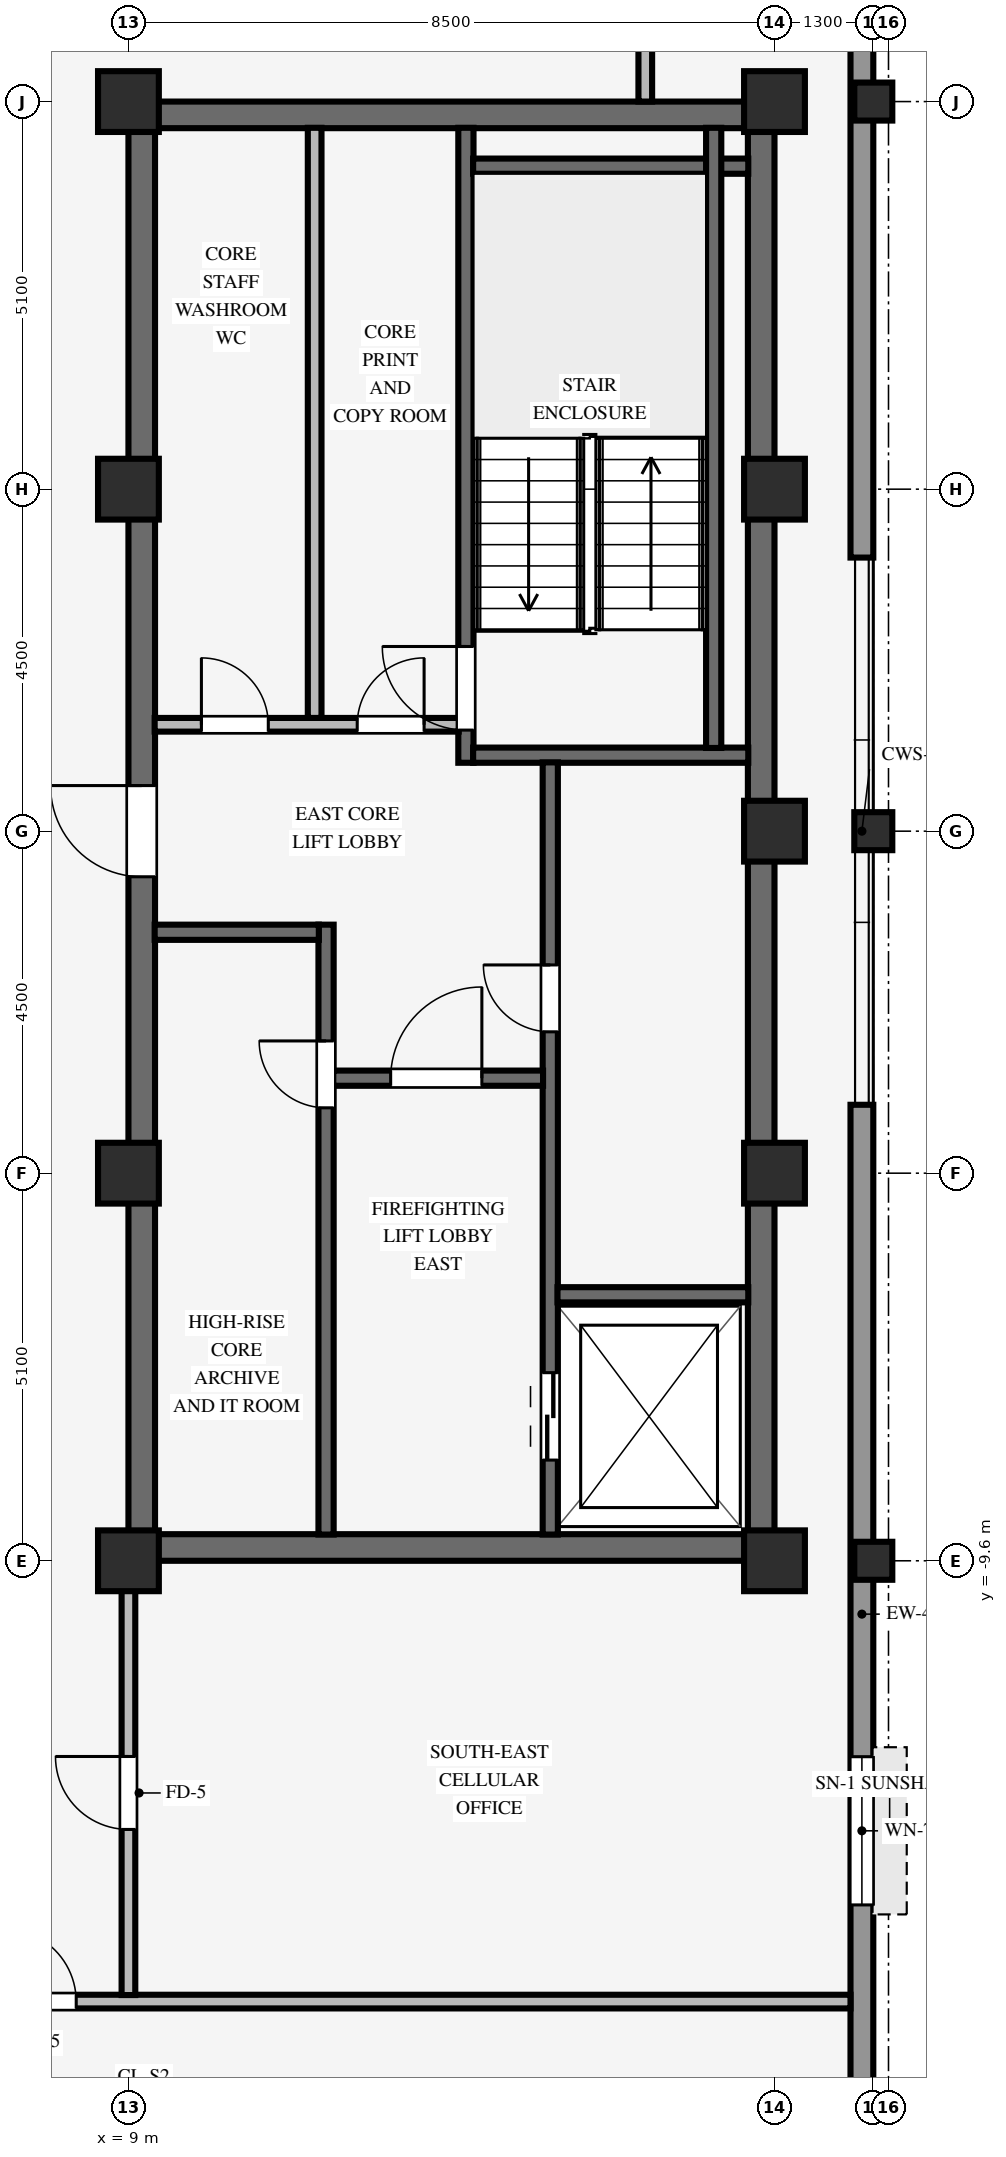
"""IFC4 building model, lengths in metres.
Left out: names, types, materials, properties, quantities, classifications, styles, units other than length and angle.
Written with IfcOpenShell. Run it as: python <this file> out.ifc"""

import sys

from ifc_helpers import new_model, si_unit, direction, frame, frame_2d, origin, origin_2d, place, context, subcontext, project, spatial, rectangle, hollow_rectangle, extrude, source, transform, mapped, element, fill, save


model = new_model("IFC4")
c1 = context("Model", 3, precision=1e-05, world=origin(), true_north=direction((0.0, 1.0)))
c2 = subcontext(c1, "Body", "Model", "MODEL_VIEW")
j1 = project(units=[si_unit("LENGTHUNIT", "METRE"), si_unit("PLANEANGLEUNIT", "RADIAN")], contexts=[c1])
p1 = place(None, origin())
s1 = spatial("IfcSite", under=j1, at=p1, CompositionType="ELEMENT")
p2 = place(p1, origin())
s2 = spatial("IfcBuilding", under=s1, at=p2, CompositionType="ELEMENT")
p3 = place(p2, frame((0.0, 0.0, 249.3)))
s3 = spatial("IfcBuildingStorey", under=s2, at=p3, CompositionType="ELEMENT", Elevation=249.3)
for number, where, z_axis, x_axis in (
    (1, (9.0, -9.425, 0.0), (0.0, 0.0, 1.0), (1.0, 0.0, 0.0)),
    (2, (9.0, 9.425, 0.0), (0.0, 0.0, 1.0), (1.0, 0.0, 0.0)),
):
    element("IfcWall", number, at=place(p3, frame(where, z_axis=z_axis, x_axis=x_axis)), inside=s3, PredefinedType="SHEAR", context=c2, shape_type="SweptSolid", body=[
        extrude(rectangle(XDim=8.5, YDim=0.35, at=frame_2d((4.25, 0.0))), origin(), (0.0, 0.0, 1.0), 3.25),
    ])
p4 = place(p3, frame((9.175, -9.255, 0.0), z_axis=(0.0, 0.0, 1.0), x_axis=(0.0, 1.0, 0.0)))
e3 = element("IfcWall", 3, at=p4, inside=s3, PredefinedType="SHEAR", context=c2, shape_type="SweptSolid", body=[
    extrude(rectangle(XDim=18.51, YDim=0.35, at=frame_2d((9.255, 0.0))), origin(), (0.0, 0.0, 1.0), 3.25),
])
p5 = place(p4, frame((8.655, 0.0, 0.0)))
e4 = element("IfcOpeningElement", 4, at=p5, cuts=e3, PredefinedType="OPENING", context=c2, shape_type="SweptSolid", body=[
    extrude(rectangle(XDim=1.2, YDim=2.15, at=frame_2d((0.6, 1.075))), frame((0.0, 0.185, 0.0), z_axis=(0.0, -1.0, 0.0), x_axis=(1.0, 0.0, 0.0)), (0.0, 0.0, 1.0), 0.37),
])
p6 = place(p3, frame((17.325, -9.255, 0.0), z_axis=(0.0, 0.0, 1.0), x_axis=(0.0, 1.0, 0.0)))
e5 = element("IfcWall", 5, at=p6, inside=s3, PredefinedType="SHEAR", context=c2, shape_type="SweptSolid", body=[
    extrude(rectangle(XDim=18.51, YDim=0.35, at=frame_2d((9.255, 0.0))), origin(), (0.0, 0.0, 1.0), 3.25),
])
for number, where, z_axis, x_axis in (
    (6, (9.0, -9.6, 0.0), (0.0, 0.0, 1.0), (1.0, 0.0, 0.0)),
    (7, (9.0, -4.5, 0.0), (0.0, 0.0, 1.0), (1.0, 0.0, 0.0)),
    (8, (9.0, 4.5, 0.0), (0.0, 0.0, 1.0), (1.0, 0.0, 0.0)),
    (9, (9.0, 9.6, 0.0), (0.0, 0.0, 1.0), (1.0, 0.0, 0.0)),
    (10, (17.5, -9.6, 0.0), (0.0, 0.0, 1.0), (1.0, 0.0, 0.0)),
    (11, (17.5, -4.5, 0.0), (0.0, 0.0, 1.0), (1.0, 0.0, 0.0)),
    (12, (17.5, 4.5, 0.0), (0.0, 0.0, 1.0), (1.0, 0.0, 0.0)),
    (13, (17.5, 9.6, 0.0), (0.0, 0.0, 1.0), (1.0, 0.0, 0.0)),
    (14, (17.5, 0.0, 0.0), (0.0, 0.0, 1.0), (1.0, 0.0, 0.0)),
):
    element("IfcColumn", number, at=place(p3, frame(where, z_axis=z_axis, x_axis=x_axis)), inside=s3, PredefinedType="COLUMN", context=c2, shape_type="SweptSolid", body=[
        extrude(rectangle(XDim=0.8, YDim=0.8, at=origin_2d()), origin(), (0.0, 0.0, 1.0), 3.25),
    ])
for number, where, z_axis, x_axis in (
    (15, (18.8, -9.6, 0.0), (0.0, 0.0, 1.0), (1.0, 0.0, 0.0)),
    (16, (18.8, 0.0, 0.0), (0.0, 0.0, 1.0), (1.0, 0.0, 0.0)),
    (17, (18.8, 9.6, 0.0), (0.0, 0.0, 1.0), (1.0, 0.0, 0.0)),
):
    element("IfcColumn", number, at=place(p3, frame(where, z_axis=z_axis, x_axis=x_axis)), inside=s3, PredefinedType="COLUMN", context=c2, shape_type="SweptSolid", body=[
        extrude(hollow_rectangle(XDim=0.5, YDim=0.5, WallThickness=0.032, InnerFilletRadius=0.032, OuterFilletRadius=0.064, at=origin_2d()), origin(), (0.0, 0.0, 1.0), 3.25),
    ])
p7 = place(p3, frame((18.65, -17.004, 0.0), z_axis=(0.0, 0.0, 1.0), x_axis=(0.0, 1.0, 0.0)))
e18 = element("IfcWall", 18, at=p7, inside=s3, PredefinedType="STANDARD", context=c2, shape_type="SweptSolid", body=[
    extrude(rectangle(XDim=13.404, YDim=0.3, at=frame_2d((6.702, 0.0))), origin(), (0.0, 0.0, 1.0), 2.585),
])
p8 = place(p7, frame((2.876, 0.0, 0.8)))
e19 = element("IfcOpeningElement", 19, at=p8, cuts=e18, PredefinedType="OPENING", context=c2, shape_type="SweptSolid", body=[
    extrude(rectangle(XDim=1.95, YDim=1.48, at=frame_2d((0.975, 0.74))), frame((0.0, 0.16, 0.0), z_axis=(0.0, -1.0, 0.0), x_axis=(1.0, 0.0, 0.0)), (0.0, 0.0, 1.0), 0.32),
])
p9 = place(p3, frame((18.65, 3.6, 0.0), z_axis=(0.0, 0.0, 1.0), x_axis=(0.0, 1.0, 0.0)))
e20 = element("IfcWall", 20, at=p9, inside=s3, PredefinedType="STANDARD", context=c2, shape_type="SweptSolid", body=[
    extrude(rectangle(XDim=13.404, YDim=0.3, at=frame_2d((6.702, 0.0))), origin(), (0.0, 0.0, 1.0), 2.585),
])
p10 = place(p9, frame((8.578, 0.0, 0.8)))
e21 = element("IfcOpeningElement", 21, at=p10, cuts=e20, PredefinedType="OPENING", context=c2, shape_type="SweptSolid", body=[
    extrude(rectangle(XDim=1.95, YDim=1.48, at=frame_2d((0.975, 0.74))), frame((0.0, 0.16, 0.0), z_axis=(0.0, -1.0, 0.0), x_axis=(1.0, 0.0, 0.0)), (0.0, 0.0, 1.0), 0.32),
])
p11 = place(p3, frame((13.44, 0.9, 0.0), z_axis=(0.0, 0.0, 1.0), x_axis=(0.0, 1.0, 0.0)))
e22 = element("IfcWall", 22, at=p11, inside=s3, PredefinedType="SHEAR", context=c2, shape_type="SweptSolid", body=[
    extrude(rectangle(XDim=8.355, YDim=0.2, at=frame_2d((4.177, 0.0))), origin(), (0.0, 0.0, 1.0), 3.25),
])
p12 = place(p11, frame((0.43, 0.0, 0.0)))
e23 = element("IfcOpeningElement", 23, at=p12, cuts=e22, PredefinedType="OPENING", context=c2, shape_type="SweptSolid", body=[
    extrude(rectangle(XDim=1.1, YDim=2.15, at=frame_2d((0.55, 1.075))), frame((0.0, 0.11, 0.0), z_axis=(0.0, -1.0, 0.0), x_axis=(1.0, 0.0, 0.0)), (0.0, 0.0, 1.0), 0.22),
])
for number, where, z_axis, x_axis in (
    (24, (13.535, 1.0, 0.0), (0.0, 0.0, 1.0), (1.0, 0.0, 0.0)),
    (25, (13.535, 8.75, 0.0), (0.0, 0.0, 1.0), (1.0, 0.0, 0.0)),
):
    element("IfcWall", number, at=place(p3, frame(where, z_axis=z_axis, x_axis=x_axis)), inside=s3, PredefinedType="SHEAR", context=c2, shape_type="SweptSolid", body=[
        extrude(rectangle(XDim=3.62, YDim=0.2, at=frame_2d((1.81, 0.0))), origin(), (0.0, 0.0, 1.0), 3.25),
    ])
p13 = place(p3, frame((16.7, 1.095, 0.0), z_axis=(0.0, 0.0, 1.0), x_axis=(0.0, 1.0, 0.0)))
e26 = element("IfcWall", 26, at=p13, inside=s3, PredefinedType="SHEAR", context=c2, shape_type="SweptSolid", body=[
    extrude(rectangle(XDim=8.16, YDim=0.2, at=frame_2d((4.08, 0.0))), origin(), (0.0, 0.0, 1.0), 3.25),
])
p14 = place(p3, frame((14.55, -9.255, 0.0), z_axis=(0.0, 0.0, 1.0), x_axis=(0.0, 1.0, 0.0)))
e27 = element("IfcWall", 27, at=p14, inside=s3, PredefinedType="SHEAR", context=c2, shape_type="SweptSolid", body=[
    extrude(rectangle(XDim=10.16, YDim=0.2, at=frame_2d((5.08, 0.0))), origin(), (0.0, 0.0, 1.0), 3.25),
])
p15 = place(p14, frame((6.615, 0.0, 0.0)))
e28 = element("IfcOpeningElement", 28, at=p15, cuts=e27, PredefinedType="OPENING", context=c2, shape_type="SweptSolid", body=[
    extrude(rectangle(XDim=0.88, YDim=2.1, at=frame_2d((0.44, 1.05))), frame((0.0, 0.11, 0.0), z_axis=(0.0, -1.0, 0.0), x_axis=(1.0, 0.0, 0.0)), (0.0, 0.0, 1.0), 0.22),
])
p16 = place(p14, frame((0.98, 0.0, 0.0)))
e29 = element("IfcOpeningElement", 29, at=p16, cuts=e27, PredefinedType="OPENING", context=c2, shape_type="SweptSolid", body=[
    extrude(rectangle(XDim=1.15, YDim=2.15, at=frame_2d((0.575, 1.075))), frame((0.0, 0.11, 0.0), z_axis=(0.0, -1.0, 0.0), x_axis=(1.0, 0.0, 0.0)), (0.0, 0.0, 1.0), 0.22),
])
p17 = place(p3, frame((14.645, -6.1, 0.0), z_axis=(0.0, 0.0, 1.0), x_axis=(1.0, 0.0, 0.0)))
e30 = element("IfcWall", 30, at=p17, inside=s3, PredefinedType="SHEAR", context=c2, shape_type="SweptSolid", body=[
    extrude(rectangle(XDim=2.51, YDim=0.2, at=frame_2d((1.255, 0.0))), origin(), (0.0, 0.0, 1.0), 3.25),
])
p18 = place(p3, frame((11.6, -9.255, 0.0), z_axis=(0.0, 0.0, 1.0), x_axis=(0.0, 1.0, 0.0)))
e31 = element("IfcWall", 31, at=p18, inside=s3, PredefinedType="SHEAR", context=c2, shape_type="SweptSolid", body=[
    extrude(rectangle(XDim=8.025, YDim=0.2, at=frame_2d((4.012, 0.0))), origin(), (0.0, 0.0, 1.0), 3.25),
])
p19 = place(p18, frame((5.615, 0.0, 0.0)))
e32 = element("IfcOpeningElement", 32, at=p19, cuts=e31, PredefinedType="OPENING", context=c2, shape_type="SweptSolid", body=[
    extrude(rectangle(XDim=0.88, YDim=2.1, at=frame_2d((0.44, 1.05))), frame((0.0, 0.11, 0.0), z_axis=(0.0, -1.0, 0.0), x_axis=(1.0, 0.0, 0.0)), (0.0, 0.0, 1.0), 0.22),
])
p20 = place(p3, frame((11.695, -3.25, 0.0), z_axis=(0.0, 0.0, 1.0), x_axis=(1.0, 0.0, 0.0)))
e33 = element("IfcWall", 33, at=p20, inside=s3, PredefinedType="SHEAR", context=c2, shape_type="SweptSolid", body=[
    extrude(rectangle(XDim=2.76, YDim=0.2, at=frame_2d((1.38, 0.0))), origin(), (0.0, 0.0, 1.0), 3.25),
])
p21 = place(p20, frame((0.755, 0.0, 0.0)))
e34 = element("IfcOpeningElement", 34, at=p21, cuts=e33, PredefinedType="OPENING", context=c2, shape_type="SweptSolid", body=[
    extrude(rectangle(XDim=1.2, YDim=2.15, at=frame_2d((0.6, 1.075))), frame((0.0, 0.11, 0.0), z_axis=(0.0, -1.0, 0.0), x_axis=(1.0, 0.0, 0.0)), (0.0, 0.0, 1.0), 0.22),
])
p22 = place(p3, frame((9.345, -1.33, 0.0), z_axis=(0.0, 0.0, 1.0), x_axis=(1.0, 0.0, 0.0)))
e35 = element("IfcWall", 35, at=p22, inside=s3, PredefinedType="SHEAR", context=c2, shape_type="SweptSolid", body=[
    extrude(rectangle(XDim=2.16, YDim=0.2, at=frame_2d((1.08, 0.0))), origin(), (0.0, 0.0, 1.0), 3.25),
])
p23 = place(p3, frame((9.345, 1.4, 0.0), z_axis=(0.0, 0.0, 1.0), x_axis=(1.0, 0.0, 0.0)))
e36 = element("IfcWall", 36, at=p23, inside=s3, PredefinedType="PARTITIONING", context=c2, shape_type="SweptSolid", body=[
    extrude(rectangle(XDim=4.0, YDim=0.18, at=frame_2d((2.0, 0.0))), origin(), (0.0, 0.0, 1.0), 3.24),
])
p24 = place(p23, frame((0.615, 0.0, 0.0)))
e37 = element("IfcOpeningElement", 37, at=p24, cuts=e36, PredefinedType="OPENING", context=c2, shape_type="SweptSolid", body=[
    extrude(rectangle(XDim=0.88, YDim=2.1, at=frame_2d((0.44, 1.05))), frame((0.0, 0.1, 0.0), z_axis=(0.0, -1.0, 0.0), x_axis=(1.0, 0.0, 0.0)), (0.0, 0.0, 1.0), 0.2),
])
p25 = place(p23, frame((2.665, 0.0, 0.0)))
e38 = element("IfcOpeningElement", 38, at=p25, cuts=e36, PredefinedType="OPENING", context=c2, shape_type="SweptSolid", body=[
    extrude(rectangle(XDim=0.88, YDim=2.1, at=frame_2d((0.44, 1.05))), frame((0.0, 0.1, 0.0), z_axis=(0.0, -1.0, 0.0), x_axis=(1.0, 0.0, 0.0)), (0.0, 0.0, 1.0), 0.2),
])
p26 = place(p3, frame((11.45, 1.49, 0.0), z_axis=(0.0, 0.0, 1.0), x_axis=(0.0, 1.0, 0.0)))
e39 = element("IfcWall", 39, at=p26, inside=s3, PredefinedType="PARTITIONING", context=c2, shape_type="SweptSolid", body=[
    extrude(rectangle(XDim=7.765, YDim=0.18, at=frame_2d((3.882, 0.0))), origin(), (0.0, 0.0, 1.0), 3.24),
])
p27 = place(p3, frame((6.666, -15.4, 0.0), z_axis=(0.0, 0.0, 1.0), x_axis=(1.0, 0.0, 0.0)))
e40 = element("IfcWall", 40, at=p27, inside=s3, PredefinedType="PARTITIONING", context=c2, shape_type="SweptSolid", body=[
    extrude(rectangle(XDim=11.834, YDim=0.18, at=frame_2d((5.917, 0.0))), origin(), (0.0, 0.0, 1.0), 3.24),
])
p28 = place(p27, frame((0.687, 0.0, 0.0)))
e41 = element("IfcOpeningElement", 41, at=p28, cuts=e40, PredefinedType="OPENING", context=c2, shape_type="SweptSolid", body=[
    extrude(rectangle(XDim=0.96, YDim=2.1, at=frame_2d((0.48, 1.05))), frame((0.0, 0.1, 0.0), z_axis=(0.0, -1.0, 0.0), x_axis=(1.0, 0.0, 0.0)), (0.0, 0.0, 1.0), 0.2),
])
p29 = place(p3, frame((9.0, -15.314, 0.0), z_axis=(0.0, 0.0, 1.0), x_axis=(0.0, 1.0, 0.0)))
e42 = element("IfcWall", 42, at=p29, inside=s3, PredefinedType="PARTITIONING", context=c2, shape_type="SweptSolid", body=[
    extrude(rectangle(XDim=5.318, YDim=0.18, at=frame_2d((2.659, 0.0))), origin(), (0.0, 0.0, 1.0), 2.335),
])
p30 = place(p29, frame((2.179, 0.0, 0.0)))
e43 = element("IfcOpeningElement", 43, at=p30, cuts=e42, PredefinedType="OPENING", context=c2, shape_type="SweptSolid", body=[
    extrude(rectangle(XDim=0.96, YDim=2.1, at=frame_2d((0.48, 1.05))), frame((0.0, 0.1, 0.0), z_axis=(0.0, -1.0, 0.0), x_axis=(1.0, 0.0, 0.0)), (0.0, 0.0, 1.0), 0.2),
])
p31 = place(p3, frame((15.8, 9.6, 0.0), z_axis=(0.0, 0.0, 1.0), x_axis=(0.0, 1.0, 0.0)))
e44 = element("IfcWall", 44, at=p31, inside=s3, PredefinedType="PARTITIONING", context=c2, shape_type="SweptSolid", body=[
    extrude(rectangle(XDim=2.514, YDim=0.18, at=frame_2d((1.257, 0.0))), origin(), (0.0, 0.0, 1.0), 3.24),
])
m1 = source(origin(), c2, "Body", "SweptSolid", [
    extrude(rectangle(XDim=1.95, YDim=1.48, at=frame_2d((0.975, 0.74))), frame((0.0, 0.03, 0.0), z_axis=(0.0, -1.0, 0.0), x_axis=(1.0, 0.0, 0.0)), (0.0, 0.0, 1.0), 0.06),
])
p32 = place(p8, origin())
e45 = element("IfcWindow", 45, at=p32, inside=s3, PartitioningType="SINGLE_PANEL", PredefinedType="WINDOW", context=c2, shape_type="MappedRepresentation", body=[
    mapped(m1, transform((0.0, 0.0, 0.0), scale=1.0)),
])
fill(e19, e45)
m2 = source(origin(), c2, "Body", "SweptSolid", [
    extrude(rectangle(XDim=1.1, YDim=2.15, at=frame_2d((0.55, 1.075))), frame((0.0, 0.025, 0.0), z_axis=(0.0, -1.0, 0.0), x_axis=(1.0, 0.0, 0.0)), (0.0, 0.0, 1.0), 0.05),
])
p33 = place(p12, origin())
e46 = element("IfcDoor", 46, at=p33, inside=s3, OperationType="SINGLE_SWING_RIGHT", PredefinedType="DOOR", context=c2, shape_type="MappedRepresentation", body=[
    mapped(m2, transform((0.0, 0.0, 0.0), scale=1.0)),
])
fill(e23, e46)
m3 = source(origin(), c2, "Body", "SweptSolid", [
    extrude(rectangle(XDim=0.88, YDim=2.1, at=frame_2d((0.44, 1.05))), frame((0.0, 0.025, 0.0), z_axis=(0.0, -1.0, 0.0), x_axis=(1.0, 0.0, 0.0)), (0.0, 0.0, 1.0), 0.05),
])
p34 = place(p15, origin())
e47 = element("IfcDoor", 47, at=p34, inside=s3, OperationType="SINGLE_SWING_RIGHT", PredefinedType="DOOR", context=c2, shape_type="MappedRepresentation", body=[
    mapped(m3, transform((0.0, 0.0, 0.0), scale=1.0)),
])
fill(e28, e47)
m4 = source(origin(), c2, "Body", "SweptSolid", [
    extrude(rectangle(XDim=1.2, YDim=2.15, at=frame_2d((0.6, 1.075))), frame((0.0, 0.025, 0.0), z_axis=(0.0, -1.0, 0.0), x_axis=(1.0, 0.0, 0.0)), (0.0, 0.0, 1.0), 0.05),
])
p35 = place(p21, origin())
e48 = element("IfcDoor", 48, at=p35, inside=s3, OperationType="SINGLE_SWING_RIGHT", PredefinedType="DOOR", context=c2, shape_type="MappedRepresentation", body=[
    mapped(m4, transform((0.0, 0.0, 0.0), scale=1.0)),
])
fill(e34, e48)
p36 = place(p19, origin())
e49 = element("IfcDoor", 49, at=p36, inside=s3, OperationType="SINGLE_SWING_RIGHT", PredefinedType="DOOR", context=c2, shape_type="MappedRepresentation", body=[
    mapped(m3, transform((0.0, 0.0, 0.0), scale=1.0)),
])
fill(e32, e49)
p37 = place(p5, origin())
e50 = element("IfcDoor", 50, at=p37, inside=s3, OperationType="SINGLE_SWING_RIGHT", PredefinedType="DOOR", context=c2, shape_type="MappedRepresentation", body=[
    mapped(m4, transform((0.0, 0.0, 0.0), scale=1.0)),
])
fill(e4, e50)
p38 = place(p24, origin())
e51 = element("IfcDoor", 51, at=p38, inside=s3, OperationType="SINGLE_SWING_LEFT", PredefinedType="DOOR", context=c2, shape_type="MappedRepresentation", body=[
    mapped(m3, transform((0.0, 0.0, 0.0), scale=1.0)),
])
fill(e37, e51)
p39 = place(p25, origin())
e52 = element("IfcDoor", 52, at=p39, inside=s3, OperationType="SINGLE_SWING_RIGHT", PredefinedType="DOOR", context=c2, shape_type="MappedRepresentation", body=[
    mapped(m3, transform((0.0, 0.0, 0.0), scale=1.0)),
])
fill(e38, e52)
m5 = source(origin(), c2, "Body", "SweptSolid", [
    extrude(rectangle(XDim=1.15, YDim=2.15, at=frame_2d((0.575, 1.075))), frame((0.0, 0.025, 0.0), z_axis=(0.0, -1.0, 0.0), x_axis=(1.0, 0.0, 0.0)), (0.0, 0.0, 1.0), 0.05),
])
p40 = place(p16, origin())
e53 = element("IfcDoor", 53, at=p40, inside=s3, OperationType="DOUBLE_DOOR_SLIDING", PredefinedType="DOOR", context=c2, shape_type="MappedRepresentation", body=[
    mapped(m5, transform((0.0, 0.0, 0.0), scale=1.0)),
])
fill(e29, e53)
m6 = source(origin(), c2, "Body", "SweptSolid", [
    extrude(rectangle(XDim=0.96, YDim=2.1, at=frame_2d((0.48, 1.05))), frame((0.0, 0.025, 0.0), z_axis=(0.0, -1.0, 0.0), x_axis=(1.0, 0.0, 0.0)), (0.0, 0.0, 1.0), 0.05),
])
p41 = place(p30, origin())
e54 = element("IfcDoor", 54, at=p41, inside=s3, OperationType="SINGLE_SWING_RIGHT", PredefinedType="DOOR", context=c2, shape_type="MappedRepresentation", body=[
    mapped(m6, transform((0.0, 0.0, 0.0), scale=1.0)),
])
fill(e43, e54)
p42 = place(p28, origin())
e55 = element("IfcDoor", 55, at=p42, inside=s3, OperationType="SINGLE_SWING_LEFT", PredefinedType="DOOR", context=c2, shape_type="MappedRepresentation", body=[
    mapped(m6, transform((0.0, 0.0, 0.0), scale=1.0)),
])
fill(e41, e55)
save(model, sys.argv[1])
